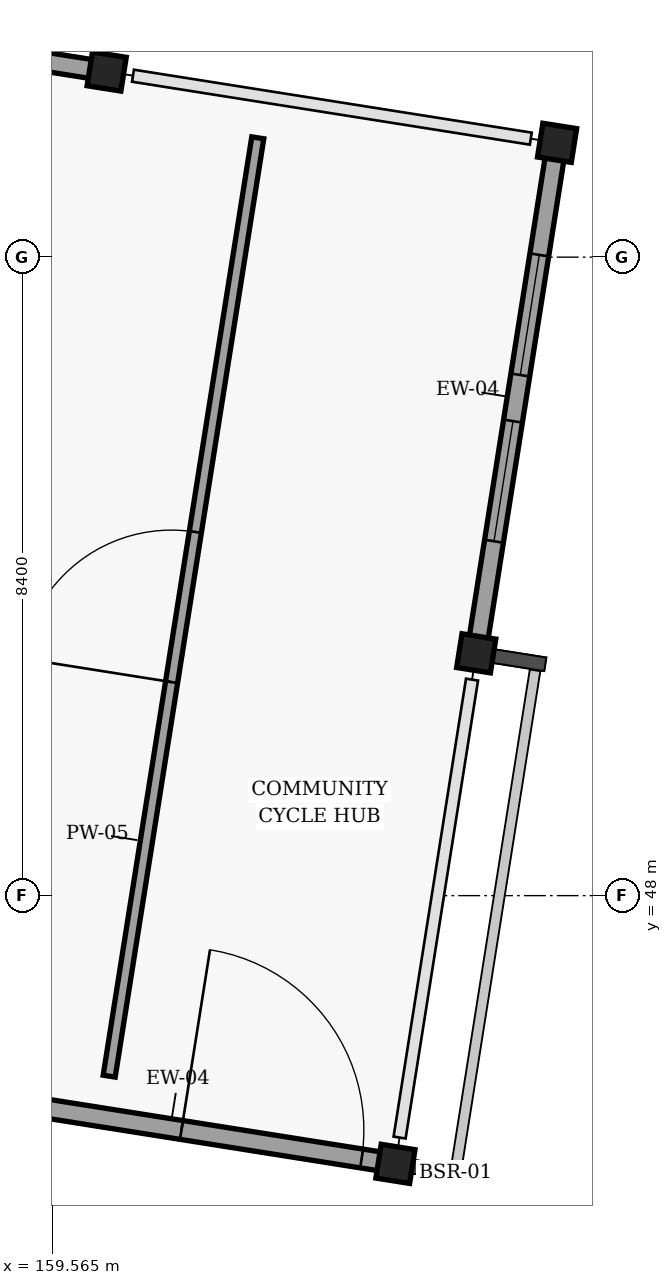
"""IFC4 building model, lengths in metres.
Left out: names, types, materials, properties, quantities, classifications, styles, units other than length and angle.
Written with IfcOpenShell. Run it as: python <this file> out.ifc"""

import sys

from ifc_helpers import new_model, si_unit, direction, frame, frame_2d, origin, origin_2d, place, context, subcontext, project, spatial, rectangle, circle, extrude, element, fill, save


model = new_model("IFC4")
c1 = context("Model", 3, precision=1e-05, world=origin(), true_north=direction((0.0, 1.0)))
c2 = subcontext(c1, "Body", "Model", "MODEL_VIEW")
j1 = project(units=[si_unit("LENGTHUNIT", "METRE"), si_unit("PLANEANGLEUNIT", "RADIAN")], contexts=[c1])
p1 = place(None, origin())
s1 = spatial("IfcSite", under=j1, at=p1, CompositionType="ELEMENT")
p2 = place(p1, origin())
s2 = spatial("IfcBuilding", under=s1, at=p2, CompositionType="ELEMENT")
p3 = place(p2, origin())
s3 = spatial("IfcBuildingStorey", under=s2, at=p3, CompositionType="ELEMENT", Elevation=0.0)
for number, where, z_axis, x_axis in (
    (1, (160.281, 58.842, 0.0), (0.0, 0.0, 1.0), (0.988, -0.156, 0.0)),
    (2, (164.08, 44.471, 0.0), (0.0, 0.0, 1.0), (0.988, -0.156, 0.0)),
    (3, (165.143, 51.188, 0.0), (0.0, 0.0, 1.0), (0.988, -0.156, 0.0)),
    (4, (166.207, 57.904, 0.0), (0.0, 0.0, 1.0), (0.988, -0.156, 0.0)),
):
    element("IfcColumn", number, at=place(p3, frame(where, z_axis=z_axis, x_axis=x_axis)), inside=s3, PredefinedType="PILASTER", context=c2, shape_type="SweptSolid", body=[
        extrude(circle(Radius=0.225, at=origin_2d()), origin(), (0.0, 0.0, 1.0), 4.8),
    ])
p4 = place(p3, frame((158.233, 45.397, 0.0), z_axis=(0.0, 0.0, 1.0), x_axis=(0.987701196417, -0.156353274977, 0.0)))
e5 = element("IfcWall", 5, at=p4, inside=s3, PredefinedType="SOLIDWALL", context=c2, shape_type="SweptSolid", body=[
    extrude(rectangle(XDim=5.84, YDim=0.25, at=frame_2d((2.92, 0.0))), origin(), (0.0, 0.0, 1.0), 4.375),
])
p5 = place(p4, frame((3.07, 0.0, 0.0)))
e6 = element("IfcOpeningElement", 6, at=p5, cuts=e5, PredefinedType="OPENING", context=c2, shape_type="SweptSolid", body=[
    extrude(rectangle(XDim=2.4, YDim=2.4, at=frame_2d((1.2, 1.2))), frame((0.0, 0.135, 0.0), z_axis=(0.0, -1.0, 0.0), x_axis=(1.0, 0.0, 0.0)), (0.0, 0.0, 1.0), 0.27),
])
p6 = place(p3, frame((165.156, 51.267, 0.0), z_axis=(0.0, 0.0, 1.0), x_axis=(0.156349649217, 0.987701770369, 0.0)))
e7 = element("IfcWall", 7, at=p6, inside=s3, PredefinedType="SOLIDWALL", context=c2, shape_type="SweptSolid", body=[
    extrude(rectangle(XDim=6.639, YDim=0.25, at=frame_2d((3.32, 0.0))), origin(), (0.0, 0.0, 1.0), 4.375),
])
p7 = place(p6, frame((1.413, 0.0, 0.9)))
e8 = element("IfcOpeningElement", 8, at=p7, cuts=e7, PredefinedType="OPENING", context=c2, shape_type="SweptSolid", body=[
    extrude(rectangle(XDim=1.6, YDim=2.1, at=frame_2d((0.8, 1.05))), frame((0.0, 0.135, 0.0), z_axis=(0.0, -1.0, 0.0), x_axis=(1.0, 0.0, 0.0)), (0.0, 0.0, 1.0), 0.27),
])
p8 = place(p6, frame((3.627, 0.0, 0.9)))
e9 = element("IfcOpeningElement", 9, at=p8, cuts=e7, PredefinedType="OPENING", context=c2, shape_type="SweptSolid", body=[
    extrude(rectangle(XDim=1.6, YDim=2.1, at=frame_2d((0.8, 1.05))), frame((0.0, 0.135, 0.0), z_axis=(0.0, -1.0, 0.0), x_axis=(1.0, 0.0, 0.0)), (0.0, 0.0, 1.0), 0.27),
])
p9 = place(p3, frame((151.965, 60.159, 0.0), z_axis=(0.0, 0.0, 1.0), x_axis=(0.987699982026, -0.156360946233, 0.0)))
e10 = element("IfcWall", 10, at=p9, inside=s3, PredefinedType="SOLIDWALL", context=c2, shape_type="SweptSolid", body=[
    extrude(rectangle(XDim=8.339, YDim=0.25, at=frame_2d((4.17, 0.0))), origin(), (0.0, 0.0, 1.0), 4.375),
])
p10 = place(p9, frame((1.98, 0.0, 0.9)))
e11 = element("IfcOpeningElement", 11, at=p10, cuts=e10, PredefinedType="OPENING", context=c2, shape_type="SweptSolid", body=[
    extrude(rectangle(XDim=1.6, YDim=2.1, at=frame_2d((0.8, 1.05))), frame((0.0, 0.135, 0.0), z_axis=(0.0, -1.0, 0.0), x_axis=(1.0, 0.0, 0.0)), (0.0, 0.0, 1.0), 0.27),
])
p11 = place(p9, frame((4.76, 0.0, 0.9)))
e12 = element("IfcOpeningElement", 12, at=p11, cuts=e10, PredefinedType="OPENING", context=c2, shape_type="SweptSolid", body=[
    extrude(rectangle(XDim=1.6, YDim=2.1, at=frame_2d((0.8, 1.05))), frame((0.0, 0.135, 0.0), z_axis=(0.0, -1.0, 0.0), x_axis=(1.0, 0.0, 0.0)), (0.0, 0.0, 1.0), 0.27),
])
p12 = place(p3, frame((160.314, 45.625, 0.0), z_axis=(0.0, 0.0, 1.0), x_axis=(0.156420950688, 0.987690480963, 0.0)))
e13 = element("IfcWall", 13, at=p12, inside=s3, PredefinedType="PARTITIONING", context=c2, shape_type="SweptSolid", body=[
    extrude(rectangle(XDim=12.499, YDim=0.16, at=frame_2d((6.25, 0.0))), origin(), (0.0, 0.0, 1.0), 4.545),
])
p13 = place(p12, frame((5.249, 0.0, 0.0)))
e14 = element("IfcOpeningElement", 14, at=p13, cuts=e13, PredefinedType="OPENING", context=c2, shape_type="SweptSolid", body=[
    extrude(rectangle(XDim=2.0, YDim=2.3, at=frame_2d((1.0, 1.15))), frame((0.0, 0.09, 0.0), z_axis=(0.0, -1.0, 0.0), x_axis=(1.0, 0.0, 0.0)), (0.0, 0.0, 1.0), 0.18),
])
p14 = place(p7, origin())
e15 = element("IfcWindow", 15, at=p14, inside=s3, PartitioningType="SINGLE_PANEL", PredefinedType="WINDOW", context=c2, shape_type="SweptSolid", body=[
    extrude(rectangle(XDim=1.6, YDim=2.1, at=frame_2d((0.8, 1.05))), frame((0.0, 0.03, 0.0), z_axis=(0.0, -1.0, 0.0), x_axis=(1.0, 0.0, 0.0)), (0.0, 0.0, 1.0), 0.06),
])
fill(e8, e15)
p15 = place(p8, origin())
e16 = element("IfcWindow", 16, at=p15, inside=s3, PartitioningType="SINGLE_PANEL", PredefinedType="WINDOW", context=c2, shape_type="SweptSolid", body=[
    extrude(rectangle(XDim=1.6, YDim=2.1, at=frame_2d((0.8, 1.05))), frame((0.0, 0.03, 0.0), z_axis=(0.0, -1.0, 0.0), x_axis=(1.0, 0.0, 0.0)), (0.0, 0.0, 1.0), 0.06),
])
fill(e9, e16)
p16 = place(p5, origin())
e17 = element("IfcDoor", 17, at=p16, inside=s3, OperationType="DOUBLE_DOOR_SINGLE_SWING", PredefinedType="DOOR", context=c2, shape_type="SweptSolid", body=[
    extrude(rectangle(XDim=2.4, YDim=2.4, at=frame_2d((1.2, 1.2))), frame((0.0, 0.025, 0.0), z_axis=(0.0, -1.0, 0.0), x_axis=(1.0, 0.0, 0.0)), (0.0, 0.0, 1.0), 0.05),
])
fill(e6, e17)
p17 = place(p13, origin())
e18 = element("IfcDoor", 18, at=p17, inside=s3, OperationType="DOUBLE_DOOR_SINGLE_SWING", PredefinedType="DOOR", context=c2, shape_type="SweptSolid", body=[
    extrude(rectangle(XDim=2.0, YDim=2.3, at=frame_2d((1.0, 1.15))), frame((0.0, 0.025, 0.0), z_axis=(0.0, -1.0, 0.0), x_axis=(1.0, 0.0, 0.0)), (0.0, 0.0, 1.0), 0.05),
])
fill(e14, e18)
save(model, sys.argv[1])
